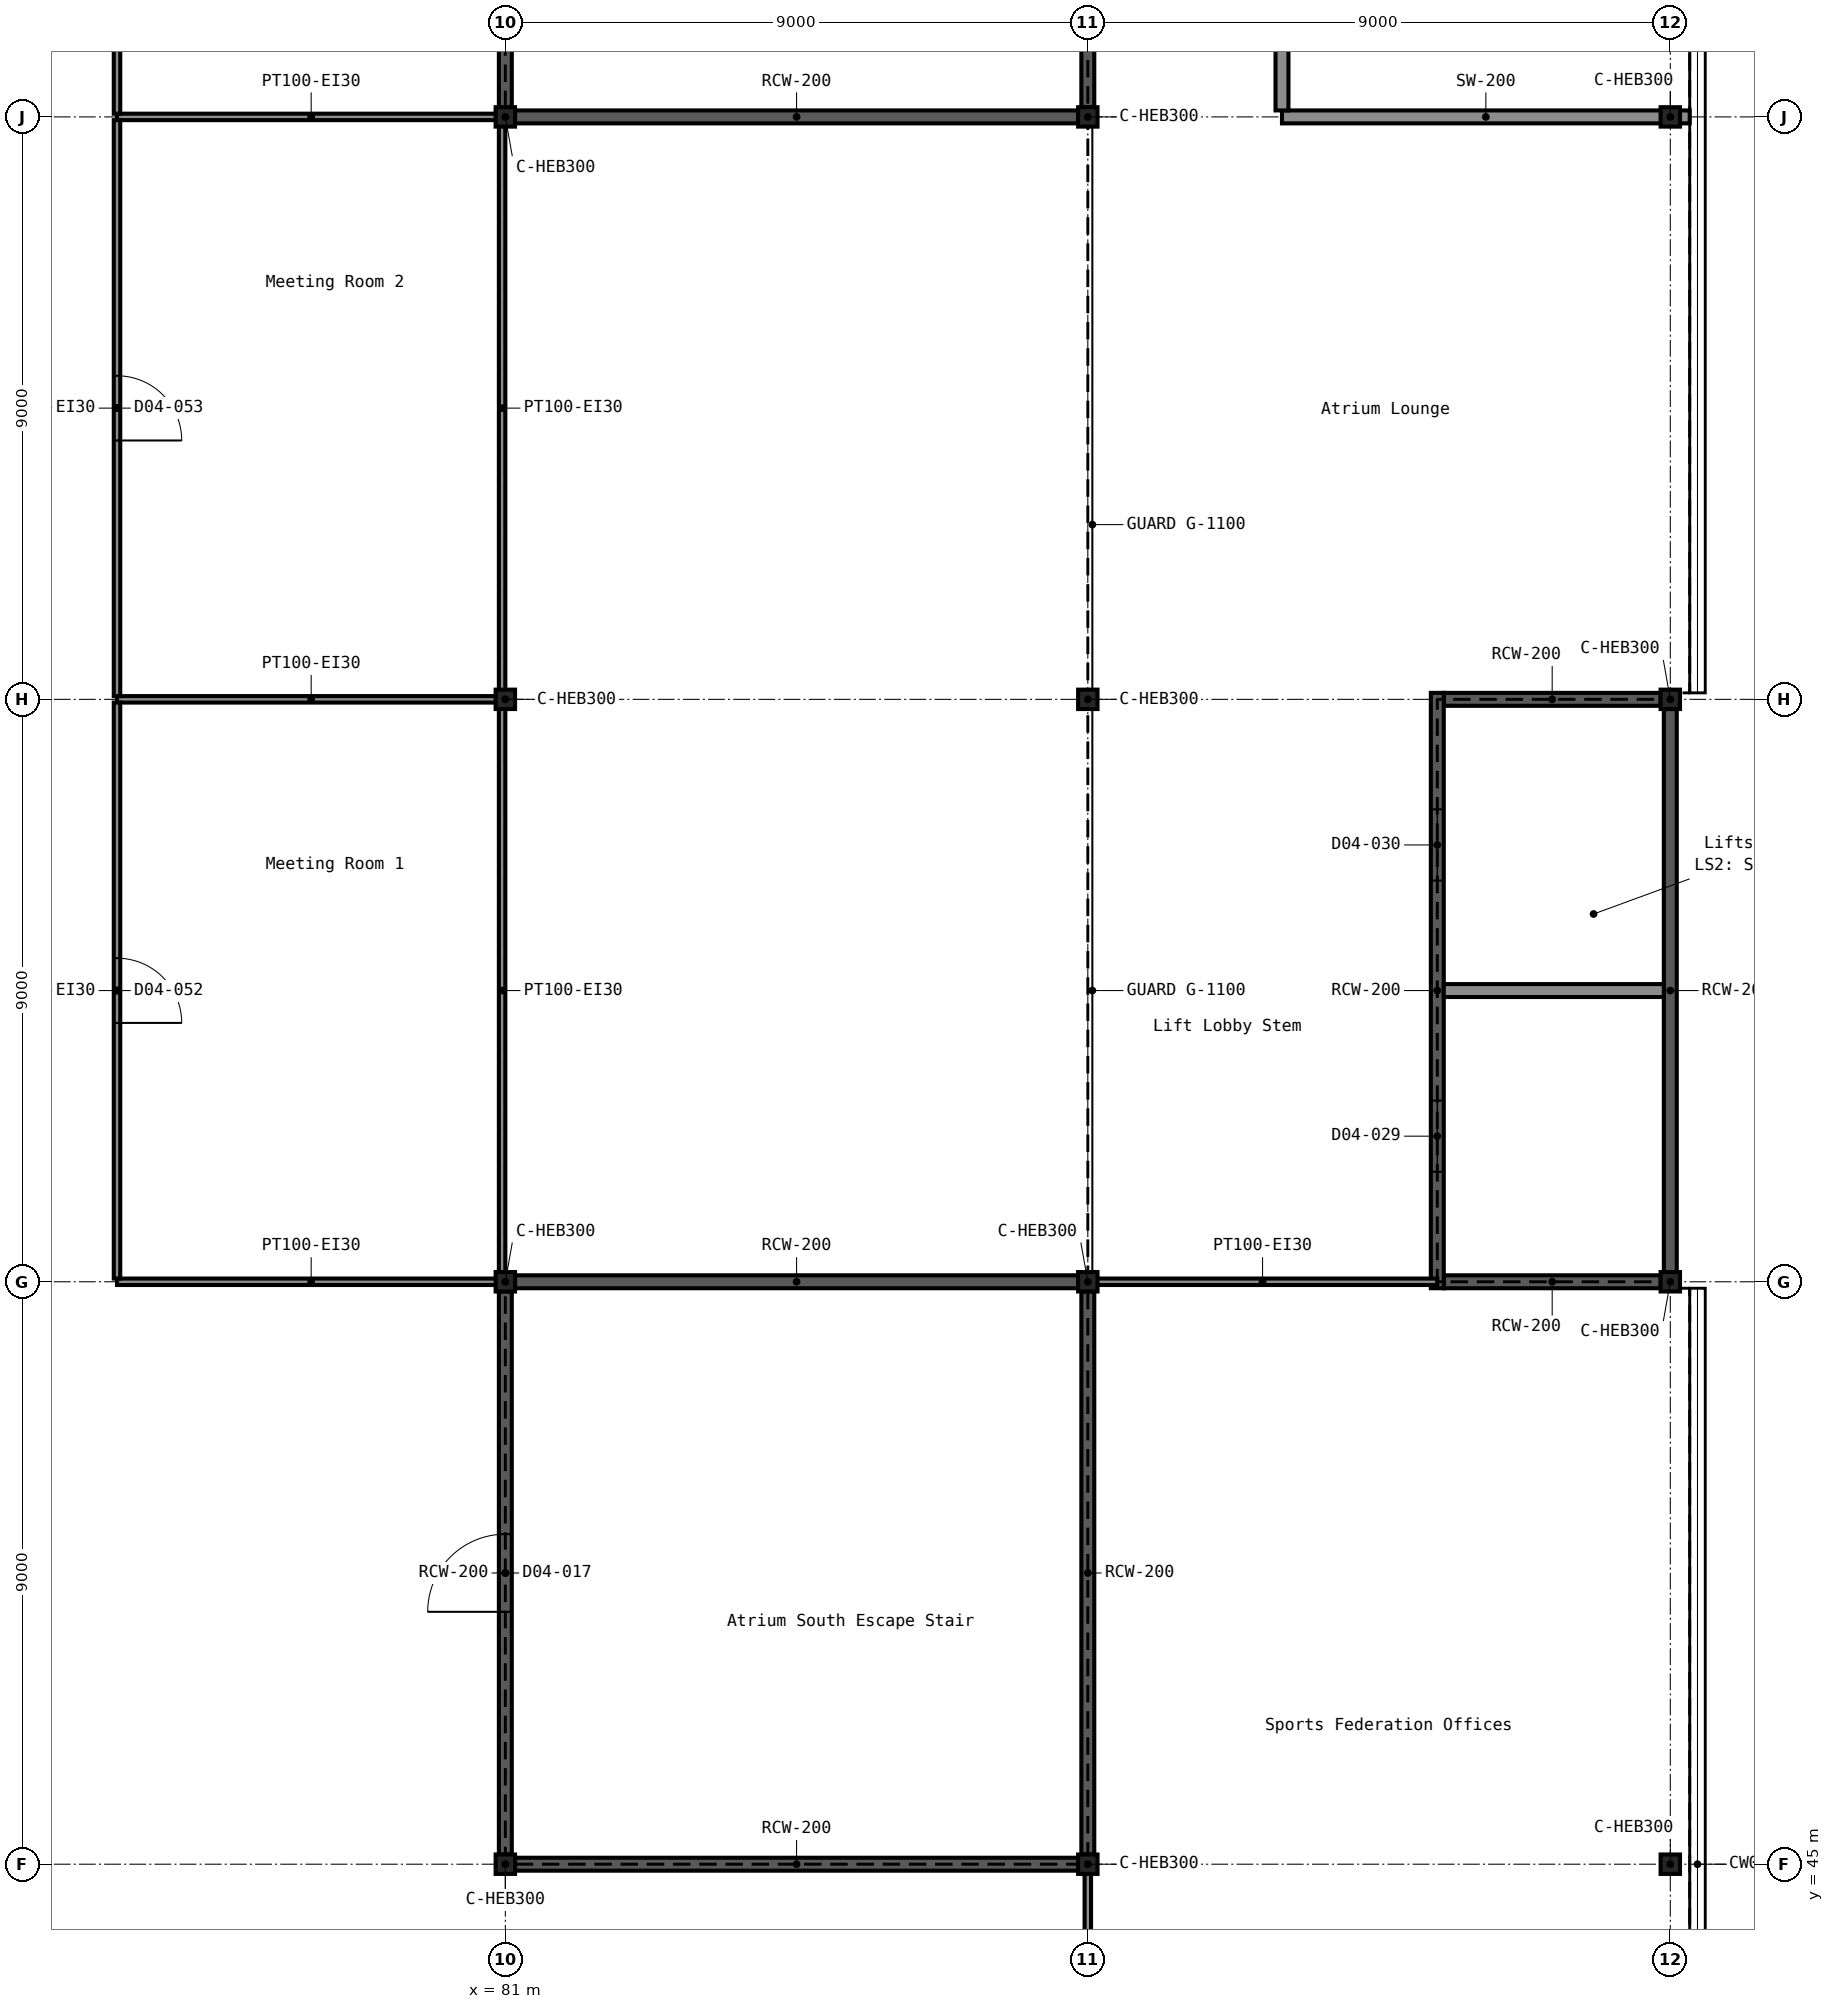
"""IFC4 building model, lengths in metres.
Left out: names, types, materials, properties, quantities, classifications, styles, units other than length and angle.
Written with IfcOpenShell. Run it as: python <this file> out.ifc"""

import sys

from ifc_helpers import new_model, si_unit, direction, frame, frame_2d, origin, origin_2d, place, context, subcontext, project, spatial, rectangle, i_section, extrude, element, fill, save


model = new_model("IFC4")
c1 = context("Model", 3, precision=1e-05, world=origin(), true_north=direction((0.0, 1.0)))
c2 = subcontext(c1, "Body", "Model", "MODEL_VIEW")
j1 = project(units=[si_unit("LENGTHUNIT", "METRE"), si_unit("PLANEANGLEUNIT", "RADIAN")], contexts=[c1])
p1 = place(None, origin())
s1 = spatial("IfcSite", under=j1, at=p1, CompositionType="ELEMENT")
p2 = place(p1, origin())
s2 = spatial("IfcBuilding", under=s1, at=p2, CompositionType="ELEMENT")
p3 = place(p2, frame((0.0, 0.0, 21.6)))
s3 = spatial("IfcBuildingStorey", under=s2, at=p3, CompositionType="ELEMENT", Elevation=21.6)
for number, where, z_axis, x_axis in (
    (1, (81.0, 45.0, 0.0), (0.0, 0.0, 1.0), (1.0, 0.0, 0.0)),
    (2, (90.0, 45.0, 0.0), (0.0, 0.0, 1.0), (1.0, 0.0, 0.0)),
    (3, (99.0, 45.0, 0.0), (0.0, 0.0, 1.0), (0.0, 1.0, 0.0)),
    (4, (81.0, 54.0, 0.0), (0.0, 0.0, 1.0), (1.0, 0.0, 0.0)),
    (5, (90.0, 54.0, 0.0), (0.0, 0.0, 1.0), (1.0, 0.0, 0.0)),
    (6, (99.0, 54.0, 0.0), (0.0, 0.0, 1.0), (0.0, 1.0, 0.0)),
    (7, (81.0, 63.0, 0.0), (0.0, 0.0, 1.0), (1.0, 0.0, 0.0)),
    (8, (90.0, 63.0, 0.0), (0.0, 0.0, 1.0), (1.0, 0.0, 0.0)),
    (9, (99.0, 63.0, 0.0), (0.0, 0.0, 1.0), (0.0, 1.0, 0.0)),
    (10, (81.0, 72.0, 0.0), (0.0, 0.0, 1.0), (1.0, 0.0, 0.0)),
    (11, (90.0, 72.0, 0.0), (0.0, 0.0, 1.0), (1.0, 0.0, 0.0)),
    (12, (99.0, 72.0, 0.0), (0.0, 0.0, 1.0), (0.0, 1.0, 0.0)),
):
    element("IfcColumn", number, at=place(p3, frame(where, z_axis=z_axis, x_axis=x_axis)), inside=s3, PredefinedType="COLUMN", context=c2, shape_type="SweptSolid", body=[
        extrude(i_section(OverallWidth=0.3, OverallDepth=0.3, WebThickness=0.011, FlangeThickness=0.019, FilletRadius=0.027, at=origin_2d()), origin(), (0.0, 0.0, 1.0), 5.4),
    ])
for number, where, z_axis, x_axis in (
    (13, (81.15, 45.0, 0.0), (0.0, 0.0, 1.0), (1.0, 0.0, 0.0)),
    (14, (81.15, 54.0, 0.0), (0.0, 0.0, 1.0), (1.0, 0.0, 0.0)),
):
    element("IfcWall", number, at=place(p3, frame(where, z_axis=z_axis, x_axis=x_axis)), inside=s3, PredefinedType="SHEAR", context=c2, shape_type="SweptSolid", body=[
        extrude(rectangle(XDim=8.7, YDim=0.2, at=frame_2d((4.35, 0.0))), origin(), (0.0, 0.0, 1.0), 5.4),
    ])
p4 = place(p3, frame((81.0, 45.15, 0.0), z_axis=(0.0, 0.0, 1.0), x_axis=(0.0, 1.0, 0.0)))
e15 = element("IfcWall", 15, at=p4, inside=s3, PredefinedType="SHEAR", context=c2, shape_type="SweptSolid", body=[
    extrude(rectangle(XDim=8.7, YDim=0.2, at=frame_2d((4.35, 0.0))), origin(), (0.0, 0.0, 1.0), 5.4),
])
p5 = place(p4, frame((3.75, 0.0, 0.0)))
e16 = element("IfcOpeningElement", 16, at=p5, cuts=e15, PredefinedType="OPENING", context=c2, shape_type="SweptSolid", body=[
    extrude(rectangle(XDim=1.2, YDim=2.1, at=frame_2d((0.6, 1.05))), frame((0.0, 0.111, 0.0), z_axis=(0.0, -1.0, 0.0), x_axis=(1.0, 0.0, 0.0)), (0.0, 0.0, 1.0), 0.222),
])
for number, where, z_axis, x_axis in (
    (17, (90.0, 45.15, 0.0), (0.0, 0.0, 1.0), (0.0, 1.0, 0.0)),
    (18, (81.15, 72.0, 0.0), (0.0, 0.0, 1.0), (1.0, 0.0, 0.0)),
    (19, (81.0, 72.15, 0.0), (0.0, 0.0, 1.0), (0.0, 1.0, 0.0)),
    (20, (90.0, 72.15, 0.0), (0.0, 0.0, 1.0), (0.0, 1.0, 0.0)),
):
    element("IfcWall", number, at=place(p3, frame(where, z_axis=z_axis, x_axis=x_axis)), inside=s3, PredefinedType="SHEAR", context=c2, shape_type="SweptSolid", body=[
        extrude(rectangle(XDim=8.7, YDim=0.2, at=frame_2d((4.35, 0.0))), origin(), (0.0, 0.0, 1.0), 5.4),
    ])
for number, where, z_axis, x_axis in (
    (21, (95.5, 54.0, 0.0), (0.0, 0.0, 1.0), (1.0, 0.0, 0.0)),
    (22, (95.5, 63.0, 0.0), (0.0, 0.0, 1.0), (1.0, 0.0, 0.0)),
):
    element("IfcWall", number, at=place(p3, frame(where, z_axis=z_axis, x_axis=x_axis)), inside=s3, PredefinedType="SHEAR", context=c2, shape_type="SweptSolid", body=[
        extrude(rectangle(XDim=3.35, YDim=0.2, at=frame_2d((1.675, 0.0))), origin(), (0.0, 0.0, 1.0), 5.4),
    ])
p6 = place(p3, frame((95.4, 53.9, 0.0), z_axis=(0.0, 0.0, 1.0), x_axis=(0.0, 1.0, 0.0)))
e23 = element("IfcWall", 23, at=p6, inside=s3, PredefinedType="SHEAR", context=c2, shape_type="SweptSolid", body=[
    extrude(rectangle(XDim=9.2, YDim=0.2, at=frame_2d((4.6, 0.0))), origin(), (0.0, 0.0, 1.0), 5.4),
])
p7 = place(p6, frame((1.8, 0.0, 0.0)))
e24 = element("IfcOpeningElement", 24, at=p7, cuts=e23, PredefinedType="OPENING", context=c2, shape_type="SweptSolid", body=[
    extrude(rectangle(XDim=1.1, YDim=2.1, at=frame_2d((0.55, 1.05))), frame((0.0, 0.111, 0.0), z_axis=(0.0, -1.0, 0.0), x_axis=(1.0, 0.0, 0.0)), (0.0, 0.0, 1.0), 0.222),
])
p8 = place(p6, frame((6.3, 0.0, 0.0)))
e25 = element("IfcOpeningElement", 25, at=p8, cuts=e23, PredefinedType="OPENING", context=c2, shape_type="SweptSolid", body=[
    extrude(rectangle(XDim=1.1, YDim=2.1, at=frame_2d((0.55, 1.05))), frame((0.0, 0.111, 0.0), z_axis=(0.0, -1.0, 0.0), x_axis=(1.0, 0.0, 0.0)), (0.0, 0.0, 1.0), 0.222),
])
p9 = place(p3, frame((99.0, 54.15, 0.0), z_axis=(0.0, 0.0, 1.0), x_axis=(0.0, 1.0, 0.0)))
e26 = element("IfcWall", 26, at=p9, inside=s3, PredefinedType="SHEAR", context=c2, shape_type="SweptSolid", body=[
    extrude(rectangle(XDim=8.7, YDim=0.2, at=frame_2d((4.35, 0.0))), origin(), (0.0, 0.0, 1.0), 5.4),
])
p10 = place(p3, frame((95.5, 58.5, 0.0), z_axis=(0.0, 0.0, 1.0), x_axis=(1.0, 0.0, 0.0)))
e27 = element("IfcWall", 27, at=p10, inside=s3, PredefinedType="SOLIDWALL", context=c2, shape_type="SweptSolid", body=[
    extrude(rectangle(XDim=3.4, YDim=0.2, at=frame_2d((1.7, 0.0))), origin(), (0.0, 0.0, 1.0), 5.4),
])
p11 = place(p3, frame((93.0, 72.0, 0.0), z_axis=(0.0, 0.0, 1.0), x_axis=(1.0, 0.0, 0.0)))
e28 = element("IfcWall", 28, at=p11, inside=s3, PredefinedType="SOLIDWALL", context=c2, shape_type="SweptSolid", body=[
    extrude(rectangle(XDim=6.3, YDim=0.2, at=frame_2d((3.15, 0.0))), origin(), (0.0, 0.0, 1.0), 5.4),
])
p12 = place(p3, frame((93.0, 72.1, 0.0), z_axis=(0.0, 0.0, 1.0), x_axis=(0.0, 1.0, 0.0)))
e29 = element("IfcWall", 29, at=p12, inside=s3, PredefinedType="SOLIDWALL", context=c2, shape_type="SweptSolid", body=[
    extrude(rectangle(XDim=8.8, YDim=0.2, at=frame_2d((4.4, 0.0))), origin(), (0.0, 0.0, 1.0), 5.4),
])
p13 = place(p12, frame((3.8, 0.0, 0.0)))
e30 = element("IfcOpeningElement", 30, at=p13, cuts=e29, PredefinedType="OPENING", context=c2, shape_type="SweptSolid", body=[
    extrude(rectangle(XDim=1.2, YDim=2.4, at=frame_2d((0.6, 1.2))), frame((0.0, 0.111, 0.0), z_axis=(0.0, -1.0, 0.0), x_axis=(1.0, 0.0, 0.0)), (0.0, 0.0, 1.0), 0.222),
])
p14 = place(p3, frame((75.0, 54.0, 0.0), z_axis=(0.0, 0.0, 1.0), x_axis=(1.0, 0.0, 0.0)))
e31 = element("IfcWall", 31, at=p14, inside=s3, PredefinedType="PARTITIONING", context=c2, shape_type="SweptSolid", body=[
    extrude(rectangle(XDim=6.0, YDim=0.1, at=frame_2d((3.0, 0.0))), origin(), (0.0, 0.0, 1.0), 5.4),
])
p15 = place(p3, frame((90.0, 54.0, 0.0), z_axis=(0.0, 0.0, 1.0), x_axis=(1.0, 0.0, 0.0)))
e32 = element("IfcWall", 32, at=p15, inside=s3, PredefinedType="PARTITIONING", context=c2, shape_type="SweptSolid", body=[
    extrude(rectangle(XDim=5.4, YDim=0.1, at=frame_2d((2.7, 0.0))), origin(), (0.0, 0.0, 1.0), 5.4),
])
for number, where, z_axis, x_axis in (
    (33, (75.0, 63.0, 0.0), (0.0, 0.0, 1.0), (1.0, 0.0, 0.0)),
    (34, (75.0, 72.0, 0.0), (0.0, 0.0, 1.0), (1.0, 0.0, 0.0)),
):
    element("IfcWall", number, at=place(p3, frame(where, z_axis=z_axis, x_axis=x_axis)), inside=s3, PredefinedType="PARTITIONING", context=c2, shape_type="SweptSolid", body=[
        extrude(rectangle(XDim=6.0, YDim=0.1, at=frame_2d((3.0, 0.0))), origin(), (0.0, 0.0, 1.0), 5.4),
    ])
p16 = place(p3, frame((75.0, 54.05, 0.0), z_axis=(0.0, 0.0, 1.0), x_axis=(0.0, 1.0, 0.0)))
e35 = element("IfcWall", 35, at=p16, inside=s3, PredefinedType="PARTITIONING", context=c2, shape_type="SweptSolid", body=[
    extrude(rectangle(XDim=8.9, YDim=0.1, at=frame_2d((4.45, 0.0))), origin(), (0.0, 0.0, 1.0), 5.4),
])
p17 = place(p16, frame((3.95, 0.0, 0.0)))
e36 = element("IfcOpeningElement", 36, at=p17, cuts=e35, PredefinedType="OPENING", context=c2, shape_type="SweptSolid", body=[
    extrude(rectangle(XDim=1.0, YDim=2.1, at=frame_2d((0.5, 1.05))), frame((0.0, 0.061, 0.0), z_axis=(0.0, -1.0, 0.0), x_axis=(1.0, 0.0, 0.0)), (0.0, 0.0, 1.0), 0.122),
])
p18 = place(p3, frame((75.0, 63.05, 0.0), z_axis=(0.0, 0.0, 1.0), x_axis=(0.0, 1.0, 0.0)))
e37 = element("IfcWall", 37, at=p18, inside=s3, PredefinedType="PARTITIONING", context=c2, shape_type="SweptSolid", body=[
    extrude(rectangle(XDim=8.9, YDim=0.1, at=frame_2d((4.45, 0.0))), origin(), (0.0, 0.0, 1.0), 5.4),
])
p19 = place(p18, frame((3.95, 0.0, 0.0)))
e38 = element("IfcOpeningElement", 38, at=p19, cuts=e37, PredefinedType="OPENING", context=c2, shape_type="SweptSolid", body=[
    extrude(rectangle(XDim=1.0, YDim=2.1, at=frame_2d((0.5, 1.05))), frame((0.0, 0.061, 0.0), z_axis=(0.0, -1.0, 0.0), x_axis=(1.0, 0.0, 0.0)), (0.0, 0.0, 1.0), 0.122),
])
p20 = place(p3, frame((75.0, 72.05, 0.0), z_axis=(0.0, 0.0, 1.0), x_axis=(0.0, 1.0, 0.0)))
e39 = element("IfcWall", 39, at=p20, inside=s3, PredefinedType="PARTITIONING", context=c2, shape_type="SweptSolid", body=[
    extrude(rectangle(XDim=8.9, YDim=0.1, at=frame_2d((4.45, 0.0))), origin(), (0.0, 0.0, 1.0), 5.4),
])
p21 = place(p20, frame((3.95, 0.0, 0.0)))
e40 = element("IfcOpeningElement", 40, at=p21, cuts=e39, PredefinedType="OPENING", context=c2, shape_type="SweptSolid", body=[
    extrude(rectangle(XDim=1.0, YDim=2.1, at=frame_2d((0.5, 1.05))), frame((0.0, 0.061, 0.0), z_axis=(0.0, -1.0, 0.0), x_axis=(1.0, 0.0, 0.0)), (0.0, 0.0, 1.0), 0.122),
])
for number, where, z_axis, x_axis in (
    (41, (80.95, 54.05, 0.0), (0.0, 0.0, 1.0), (0.0, 1.0, 0.0)),
    (42, (80.95, 63.05, 0.0), (0.0, 0.0, 1.0), (0.0, 1.0, 0.0)),
):
    element("IfcWall", number, at=place(p3, frame(where, z_axis=z_axis, x_axis=x_axis)), inside=s3, PredefinedType="PARTITIONING", context=c2, shape_type="SweptSolid", body=[
        extrude(rectangle(XDim=8.9, YDim=0.1, at=frame_2d((4.45, 0.0))), origin(), (0.0, 0.0, 1.0), 5.4),
    ])
p22 = place(p3, frame((90.0, 36.0, 0.0), z_axis=(0.0, 0.0, 1.0), x_axis=(0.0, 1.0, 0.0)))
e43 = element("IfcWall", 43, at=p22, inside=s3, PredefinedType="PARTITIONING", context=c2, shape_type="SweptSolid", body=[
    extrude(rectangle(XDim=9.0, YDim=0.1, at=frame_2d((4.5, 0.0))), origin(), (0.0, 0.0, 1.0), 5.4),
])
p23 = place(p22, frame((3.9, 0.0, 0.0)))
e44 = element("IfcOpeningElement", 44, at=p23, cuts=e43, PredefinedType="OPENING", context=c2, shape_type="SweptSolid", body=[
    extrude(rectangle(XDim=1.2, YDim=2.1, at=frame_2d((0.6, 1.05))), frame((0.0, 0.061, 0.0), z_axis=(0.0, -1.0, 0.0), x_axis=(1.0, 0.0, 0.0)), (0.0, 0.0, 1.0), 0.122),
])
p24 = place(p5, origin())
e45 = element("IfcDoor", 45, at=p24, inside=s3, OperationType="SINGLE_SWING_LEFT", PredefinedType="DOOR", context=c2, shape_type="SweptSolid", body=[
    extrude(rectangle(XDim=1.2, YDim=2.1, at=frame_2d((0.6, 1.05))), frame((0.0, 0.025, 0.0), z_axis=(0.0, -1.0, 0.0), x_axis=(1.0, 0.0, 0.0)), (0.0, 0.0, 1.0), 0.05),
])
fill(e16, e45)
p25 = place(p7, origin())
e46 = element("IfcDoor", 46, at=p25, inside=s3, OperationType="DOUBLE_DOOR_SLIDING", PredefinedType="DOOR", context=c2, shape_type="SweptSolid", body=[
    extrude(rectangle(XDim=1.1, YDim=2.1, at=frame_2d((0.55, 1.05))), frame((0.0, 0.025, 0.0), z_axis=(0.0, -1.0, 0.0), x_axis=(1.0, 0.0, 0.0)), (0.0, 0.0, 1.0), 0.05),
])
fill(e24, e46)
p26 = place(p8, origin())
e47 = element("IfcDoor", 47, at=p26, inside=s3, OperationType="DOUBLE_DOOR_SLIDING", PredefinedType="DOOR", context=c2, shape_type="SweptSolid", body=[
    extrude(rectangle(XDim=1.1, YDim=2.1, at=frame_2d((0.55, 1.05))), frame((0.0, 0.025, 0.0), z_axis=(0.0, -1.0, 0.0), x_axis=(1.0, 0.0, 0.0)), (0.0, 0.0, 1.0), 0.05),
])
fill(e25, e47)
p27 = place(p17, frame((1.0, 0.0, 0.0), z_axis=(0.0, 0.0, 1.0), x_axis=(-1.0, 0.0, 0.0)))
e48 = element("IfcDoor", 48, at=p27, inside=s3, OperationType="SINGLE_SWING_RIGHT", PredefinedType="DOOR", context=c2, shape_type="SweptSolid", body=[
    extrude(rectangle(XDim=1.0, YDim=2.1, at=frame_2d((0.5, 1.05))), frame((0.0, 0.025, 0.0), z_axis=(0.0, -1.0, 0.0), x_axis=(1.0, 0.0, 0.0)), (0.0, 0.0, 1.0), 0.05),
])
fill(e36, e48)
p28 = place(p19, frame((1.0, 0.0, 0.0), z_axis=(0.0, 0.0, 1.0), x_axis=(-1.0, 0.0, 0.0)))
e49 = element("IfcDoor", 49, at=p28, inside=s3, OperationType="SINGLE_SWING_RIGHT", PredefinedType="DOOR", context=c2, shape_type="SweptSolid", body=[
    extrude(rectangle(XDim=1.0, YDim=2.1, at=frame_2d((0.5, 1.05))), frame((0.0, 0.025, 0.0), z_axis=(0.0, -1.0, 0.0), x_axis=(1.0, 0.0, 0.0)), (0.0, 0.0, 1.0), 0.05),
])
fill(e38, e49)
save(model, sys.argv[1])
